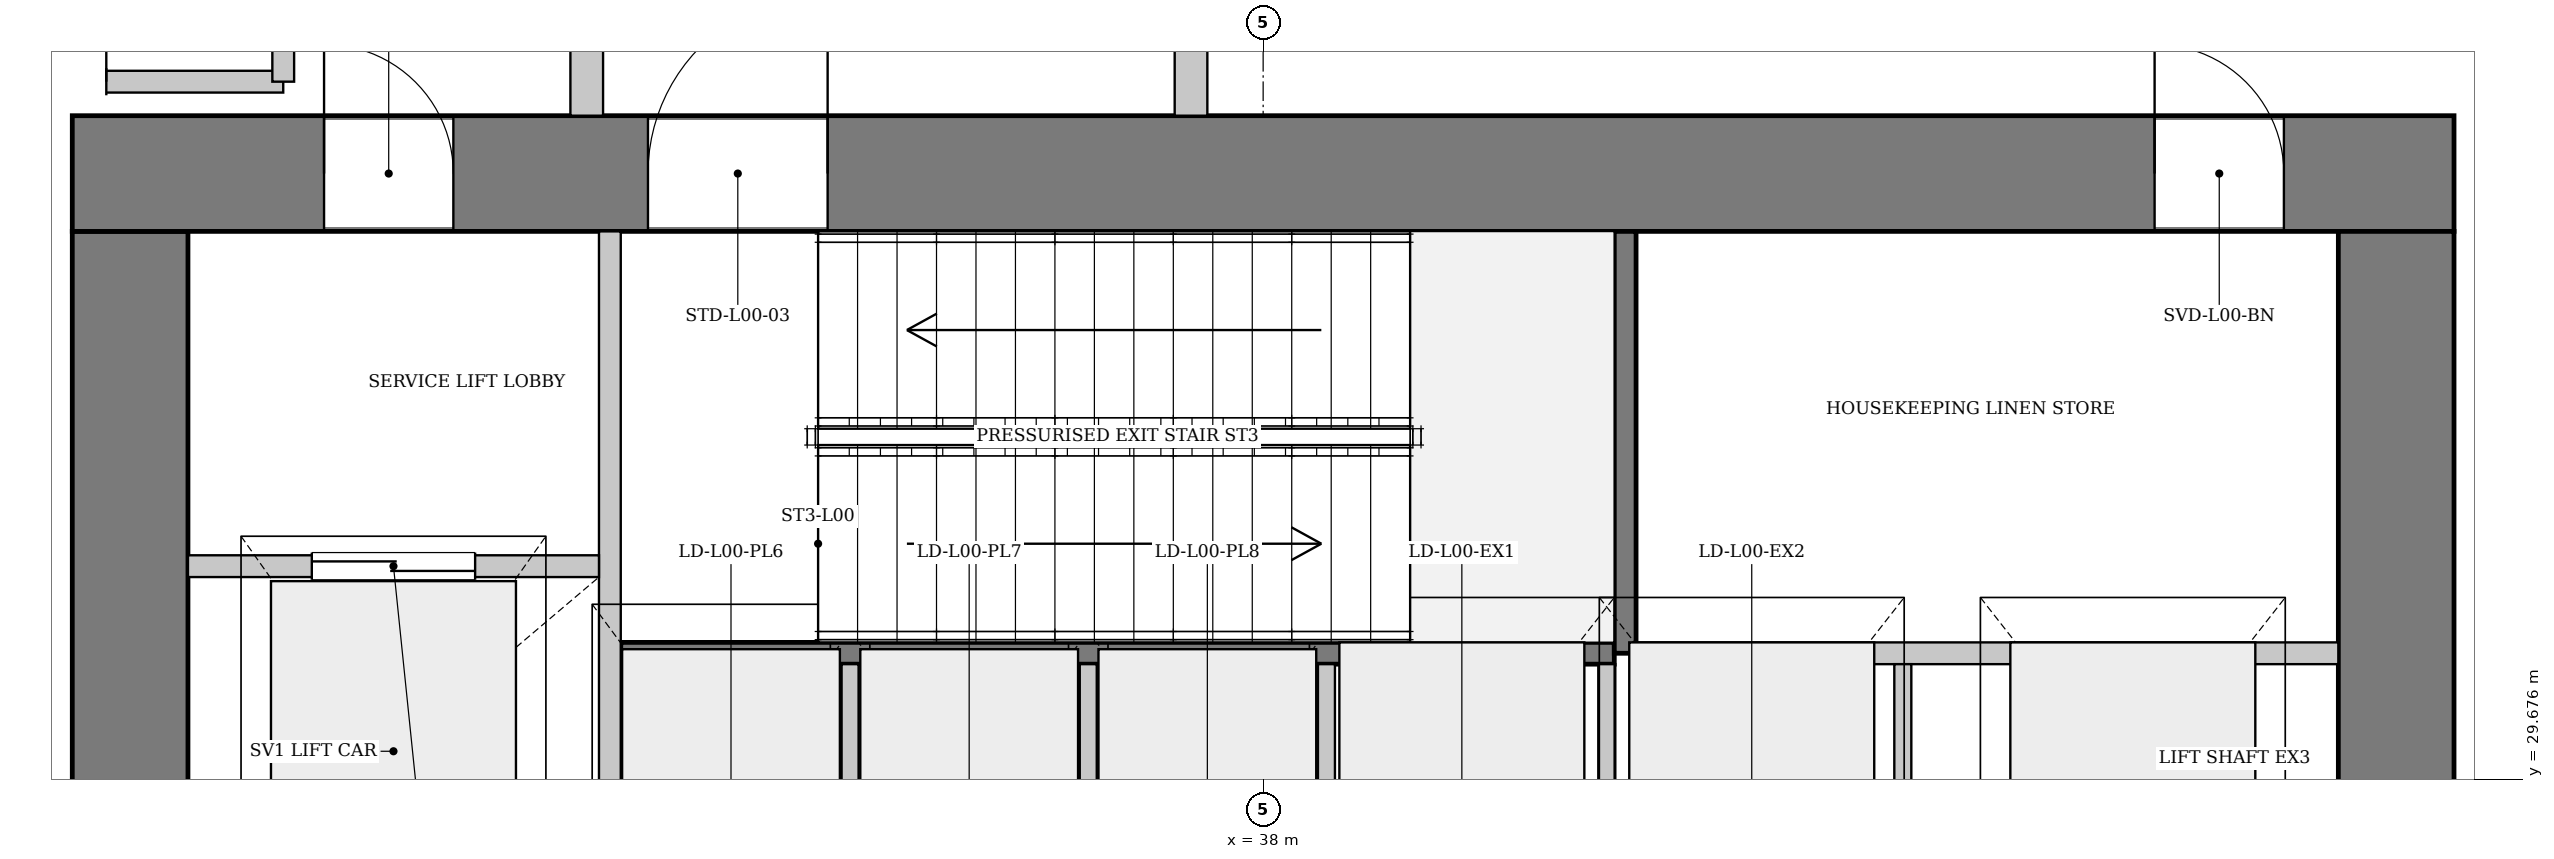
"""IFC4 building model, lengths in metres.
Left out: names, types, materials, properties, quantities, classifications, styles, units other than length and angle.
Written with IfcOpenShell. Run it as: python <this file> out.ifc"""

import sys

from ifc_helpers import new_model, si_unit, direction, frame, frame_2d, origin, place, context, subcontext, project, spatial, rectangle, extrude, source, transform, mapped, element, fill, save


model = new_model("IFC4")
c1 = context("Model", 3, precision=1e-05, world=origin(), true_north=direction((0.0, 1.0)))
c2 = subcontext(c1, "Body", "Model", "MODEL_VIEW")
j1 = project(units=[si_unit("LENGTHUNIT", "METRE"), si_unit("PLANEANGLEUNIT", "RADIAN")], contexts=[c1])
p1 = place(None, origin())
s1 = spatial("IfcSite", under=j1, at=p1, CompositionType="ELEMENT")
p2 = place(p1, origin())
s2 = spatial("IfcBuilding", under=s1, at=p2, CompositionType="ELEMENT")
p3 = place(p2, origin())
s3 = spatial("IfcBuildingStorey", under=s2, at=p3, CompositionType="ELEMENT", Elevation=0.0)
p4 = place(p3, frame((29.675, 19.5, 0.0), z_axis=(0.0, 0.0, 1.0), x_axis=(0.0, 1.0, 0.0)))
e1 = element("IfcWall", 1, at=p4, inside=s3, PredefinedType="SHEAR", context=c2, shape_type="SweptSolid", body=[
    extrude(rectangle(XDim=14.2, YDim=0.85, at=frame_2d((7.1, 0.0))), origin(), (0.0, 0.0, 1.0), 5.08),
])
p5 = place(p4, frame((7.42, 0.0, 0.0)))
e2 = element("IfcOpeningElement", 2, at=p5, cuts=e1, PredefinedType="OPENING", context=c2, shape_type="SweptSolid", body=[
    extrude(rectangle(XDim=1.6, YDim=2.2, at=frame_2d((0.8, 1.1))), frame((0.0, 0.435, 0.0), z_axis=(0.0, -1.0, 0.0), x_axis=(1.0, 0.0, 0.0)), (0.0, 0.0, 1.0), 0.87),
])
p6 = place(p3, frame((29.25, 34.125, 0.0), z_axis=(0.0, 0.0, 1.0), x_axis=(1.0, 0.0, 0.0)))
e3 = element("IfcWall", 3, at=p6, inside=s3, PredefinedType="SHEAR", context=c2, shape_type="SweptSolid", body=[
    extrude(rectangle(XDim=17.5, YDim=0.85, at=frame_2d((8.75, 0.0))), origin(), (0.0, 0.0, 1.0), 5.08),
])
p7 = place(p6, frame((1.85, 0.0, 0.0)))
e4 = element("IfcOpeningElement", 4, at=p7, cuts=e3, PredefinedType="OPENING", context=c2, shape_type="SweptSolid", body=[
    extrude(rectangle(XDim=0.95, YDim=2.1, at=frame_2d((0.475, 1.05))), frame((0.0, 0.435, 0.0), z_axis=(0.0, -1.0, 0.0), x_axis=(1.0, 0.0, 0.0)), (0.0, 0.0, 1.0), 0.87),
])
p8 = place(p6, frame((4.23, 0.0, 0.0)))
e5 = element("IfcOpeningElement", 5, at=p8, cuts=e3, PredefinedType="OPENING", context=c2, shape_type="SweptSolid", body=[
    extrude(rectangle(XDim=1.32, YDim=2.2, at=frame_2d((0.66, 1.1))), frame((0.0, 0.435, 0.0), z_axis=(0.0, -1.0, 0.0), x_axis=(1.0, 0.0, 0.0)), (0.0, 0.0, 1.0), 0.87),
])
p9 = place(p6, frame((15.3, 0.0, 0.0)))
e6 = element("IfcOpeningElement", 6, at=p9, cuts=e3, PredefinedType="OPENING", context=c2, shape_type="SweptSolid", body=[
    extrude(rectangle(XDim=0.95, YDim=2.1, at=frame_2d((0.475, 1.05))), frame((0.0, 0.435, 0.0), z_axis=(0.0, -1.0, 0.0), x_axis=(1.0, 0.0, 0.0)), (0.0, 0.0, 1.0), 0.87),
])
p10 = place(p3, frame((46.325, 33.7, 0.0), z_axis=(0.0, 0.0, 1.0), x_axis=(0.0, -1.0, 0.0)))
e7 = element("IfcWall", 7, at=p10, inside=s3, PredefinedType="SHEAR", context=c2, shape_type="SweptSolid", body=[
    extrude(rectangle(XDim=14.2, YDim=0.85, at=frame_2d((7.1, 0.0))), origin(), (0.0, 0.0, 1.0), 5.08),
])
p11 = place(p10, frame((5.18, 0.0, 0.0)))
e8 = element("IfcOpeningElement", 8, at=p11, cuts=e7, PredefinedType="OPENING", context=c2, shape_type="SweptSolid", body=[
    extrude(rectangle(XDim=1.6, YDim=2.2, at=frame_2d((0.8, 1.1))), frame((0.0, 0.435, 0.0), z_axis=(0.0, -1.0, 0.0), x_axis=(1.0, 0.0, 0.0)), (0.0, 0.0, 1.0), 0.87),
])
p12 = place(p3, frame((33.28, 30.6, 0.0), z_axis=(0.0, 0.0, 1.0), x_axis=(1.0, 0.0, 0.0)))
e9 = element("IfcWall", 9, at=p12, inside=s3, PredefinedType="PARTITIONING", context=c2, shape_type="SweptSolid", body=[
    extrude(rectangle(XDim=7.3, YDim=0.16, at=frame_2d((3.65, 0.0))), origin(), (0.0, 0.0, 1.0), 5.08),
])
p13 = place(p3, frame((40.66, 30.6, 0.0), z_axis=(0.0, 0.0, 1.0), x_axis=(0.0, 1.0, 0.0)))
e10 = element("IfcWall", 10, at=p13, inside=s3, PredefinedType="PARTITIONING", context=c2, shape_type="SweptSolid", body=[
    extrude(rectangle(XDim=3.1, YDim=0.16, at=frame_2d((1.55, 0.0))), origin(), (0.0, 0.0, 1.0), 5.08),
])
p14 = place(p3, frame((33.2, 28.44, 0.0), z_axis=(0.0, 0.0, 1.0), x_axis=(0.0, 1.0, 0.0)))
e11 = element("IfcWall", 11, at=p14, inside=s3, PredefinedType="PARTITIONING", context=c2, shape_type="SweptSolid", body=[
    extrude(rectangle(XDim=5.26, YDim=0.16, at=frame_2d((2.63, 0.0))), origin(), (0.0, 0.0, 1.0), 5.08),
])
p15 = place(p3, frame((30.1, 31.24, 0.0), z_axis=(0.0, 0.0, 1.0), x_axis=(1.0, 0.0, 0.0)))
e12 = element("IfcWall", 12, at=p15, inside=s3, PredefinedType="PARTITIONING", context=c2, shape_type="SweptSolid", body=[
    extrude(rectangle(XDim=3.02, YDim=0.16, at=frame_2d((1.51, 0.0))), origin(), (0.0, 0.0, 1.0), 5.08),
])
p16 = place(p15, frame((0.91, 0.0, 0.0)))
e13 = element("IfcOpeningElement", 13, at=p16, cuts=e12, PredefinedType="OPENING", context=c2, shape_type="SweptSolid", body=[
    extrude(rectangle(XDim=1.2, YDim=2.2, at=frame_2d((0.6, 1.1))), frame((0.0, 0.09, 0.0), z_axis=(0.0, -1.0, 0.0), x_axis=(1.0, 0.0, 0.0)), (0.0, 0.0, 1.0), 0.18),
])
p17 = place(p3, frame((40.72, 30.6, 0.0), z_axis=(0.0, 0.0, 1.0), x_axis=(1.0, 0.0, 0.0)))
e14 = element("IfcWall", 14, at=p17, inside=s3, PredefinedType="PARTITIONING", context=c2, shape_type="SweptSolid", body=[
    extrude(rectangle(XDim=5.18, YDim=0.16, at=frame_2d((2.59, 0.0))), origin(), (0.0, 0.0, 1.0), 5.08),
])
for number, where, z_axis, x_axis in (
    (15, (34.965, 28.6, 0.0), (0.0, 0.0, 1.0), (0.0, 1.0, 0.0)),
    (16, (36.715, 28.6, 0.0), (0.0, 0.0, 1.0), (0.0, 1.0, 0.0)),
    (17, (38.465, 28.6, 0.0), (0.0, 0.0, 1.0), (0.0, 1.0, 0.0)),
    (18, (40.525, 28.6, 0.0), (0.0, 0.0, 1.0), (0.0, 1.0, 0.0)),
    (19, (42.7, 28.6, 0.0), (0.0, 0.0, 1.0), (0.0, 1.0, 0.0)),
):
    element("IfcWall", number, at=place(p3, frame(where, z_axis=z_axis, x_axis=x_axis)), inside=s3, PredefinedType="PARTITIONING", context=c2, shape_type="SweptSolid", body=[
        extrude(rectangle(XDim=1.92, YDim=0.125, at=frame_2d((0.96, 0.0))), origin(), (0.0, 0.0, 1.0), 5.08),
    ])
for number, where, z_axis, x_axis in (
    (20, (33.03, 34.55, 0.0), (0.0, 0.0, 1.0), (0.0, 1.0, 0.0)),
    (21, (37.47, 34.55, 0.0), (0.0, 0.0, 1.0), (0.0, 1.0, 0.0)),
):
    element("IfcWall", number, at=place(p3, frame(where, z_axis=z_axis, x_axis=x_axis)), inside=s3, PredefinedType="PARTITIONING", context=c2, shape_type="SweptSolid", body=[
        extrude(rectangle(XDim=15.67, YDim=0.24, at=frame_2d((7.835, 0.0))), origin(), (0.0, 0.0, 1.0), 4.43),
    ])
p18 = place(p3, frame((24.2, 34.8, 0.0), z_axis=(0.0, 0.0, 1.0), x_axis=(1.0, 0.0, 0.0)))
e22 = element("IfcWall", 22, at=p18, inside=s3, PredefinedType="PARTITIONING", context=c2, shape_type="SweptSolid", body=[
    extrude(rectangle(XDim=6.6, YDim=0.16, at=frame_2d((3.3, 0.0))), origin(), (0.0, 0.0, 1.0), 4.43),
])
p19 = place(p18, frame((1.0, 0.0, 0.0)))
e23 = element("IfcOpeningElement", 23, at=p19, cuts=e22, PredefinedType="OPENING", context=c2, shape_type="SweptSolid", body=[
    extrude(rectangle(XDim=0.9, YDim=2.1, at=frame_2d((0.45, 1.05))), frame((0.0, 0.09, 0.0), z_axis=(0.0, -1.0, 0.0), x_axis=(1.0, 0.0, 0.0)), (0.0, 0.0, 1.0), 0.18),
])
p20 = place(p18, frame((4.4, 0.0, 0.0)))
e24 = element("IfcOpeningElement", 24, at=p20, cuts=e22, PredefinedType="OPENING", context=c2, shape_type="SweptSolid", body=[
    extrude(rectangle(XDim=0.9, YDim=2.1, at=frame_2d((0.45, 1.05))), frame((0.0, 0.09, 0.0), z_axis=(0.0, -1.0, 0.0), x_axis=(1.0, 0.0, 0.0)), (0.0, 0.0, 1.0), 0.18),
])
p21 = place(p3, frame((30.8, 34.8, 0.0), z_axis=(0.0, 0.0, 1.0), x_axis=(0.0, 1.0, 0.0)))
e25 = element("IfcWall", 25, at=p21, inside=s3, PredefinedType="PARTITIONING", context=c2, shape_type="SweptSolid", body=[
    extrude(rectangle(XDim=4.4, YDim=0.16, at=frame_2d((2.2, 0.0))), origin(), (0.0, 0.0, 1.0), 4.43),
])
m1 = source(origin(), c2, "Body", "SweptSolid", [
    extrude(rectangle(XDim=0.95, YDim=2.1, at=frame_2d((0.475, 1.05))), frame((0.0, 0.025, 0.0), z_axis=(0.0, -1.0, 0.0), x_axis=(1.0, 0.0, 0.0)), (0.0, 0.0, 1.0), 0.05),
])
p22 = place(p7, origin())
e26 = element("IfcDoor", 26, at=p22, inside=s3, OperationType="SINGLE_SWING_LEFT", PredefinedType="DOOR", context=c2, shape_type="MappedRepresentation", body=[
    mapped(m1, transform((0.0, 0.0, 0.0), x_axis=(1.0, 0.0, 0.0), y_axis=(0.0, 1.0, 0.0), z_axis=(0.0, 0.0, 1.0), scale=1.0)),
])
fill(e4, e26)
m2 = source(origin(), c2, "Body", "SweptSolid", [
    extrude(rectangle(XDim=1.32, YDim=2.2, at=frame_2d((0.66, 1.1))), frame((0.0, 0.025, 0.0), z_axis=(0.0, -1.0, 0.0), x_axis=(1.0, 0.0, 0.0)), (0.0, 0.0, 1.0), 0.05),
])
p23 = place(p8, origin())
e27 = element("IfcDoor", 27, at=p23, inside=s3, OperationType="SINGLE_SWING_RIGHT", PredefinedType="DOOR", context=c2, shape_type="MappedRepresentation", body=[
    mapped(m2, transform((0.0, 0.0, 0.0), x_axis=(1.0, 0.0, 0.0), y_axis=(0.0, 1.0, 0.0), z_axis=(0.0, 0.0, 1.0), scale=1.0)),
])
fill(e5, e27)
m3 = source(origin(), c2, "Body", "SweptSolid", [
    extrude(rectangle(XDim=1.2, YDim=2.2, at=frame_2d((0.6, 1.1))), frame((0.0, 0.025, 0.0), z_axis=(0.0, -1.0, 0.0), x_axis=(1.0, 0.0, 0.0)), (0.0, 0.0, 1.0), 0.05),
])
p24 = place(p16, origin())
e28 = element("IfcDoor", 28, at=p24, inside=s3, OperationType="DOUBLE_DOOR_SLIDING", PredefinedType="DOOR", context=c2, shape_type="MappedRepresentation", body=[
    mapped(m3, transform((0.0, 0.0, 0.0), x_axis=(1.0, 0.0, 0.0), y_axis=(0.0, 1.0, 0.0), z_axis=(0.0, 0.0, 1.0), scale=1.0)),
])
fill(e13, e28)
p25 = place(p9, origin())
e29 = element("IfcDoor", 29, at=p25, inside=s3, OperationType="SINGLE_SWING_LEFT", PredefinedType="DOOR", context=c2, shape_type="MappedRepresentation", body=[
    mapped(m1, transform((0.0, 0.0, 0.0), x_axis=(1.0, 0.0, 0.0), y_axis=(0.0, 1.0, 0.0), z_axis=(0.0, 0.0, 1.0), scale=1.0)),
])
fill(e6, e29)
m4 = source(origin(), c2, "Body", "SweptSolid", [
    extrude(rectangle(XDim=0.9, YDim=2.1, at=frame_2d((0.45, 1.05))), frame((0.0, 0.025, 0.0), z_axis=(0.0, -1.0, 0.0), x_axis=(1.0, 0.0, 0.0)), (0.0, 0.0, 1.0), 0.05),
])
p26 = place(p20, origin())
e30 = element("IfcDoor", 30, at=p26, inside=s3, OperationType="SINGLE_SWING_RIGHT", PredefinedType="DOOR", context=c2, shape_type="MappedRepresentation", body=[
    mapped(m4, transform((0.0, 0.0, 0.0), x_axis=(1.0, 0.0, 0.0), y_axis=(0.0, 1.0, 0.0), z_axis=(0.0, 0.0, 1.0), scale=1.0)),
])
fill(e24, e30)
save(model, sys.argv[1])
